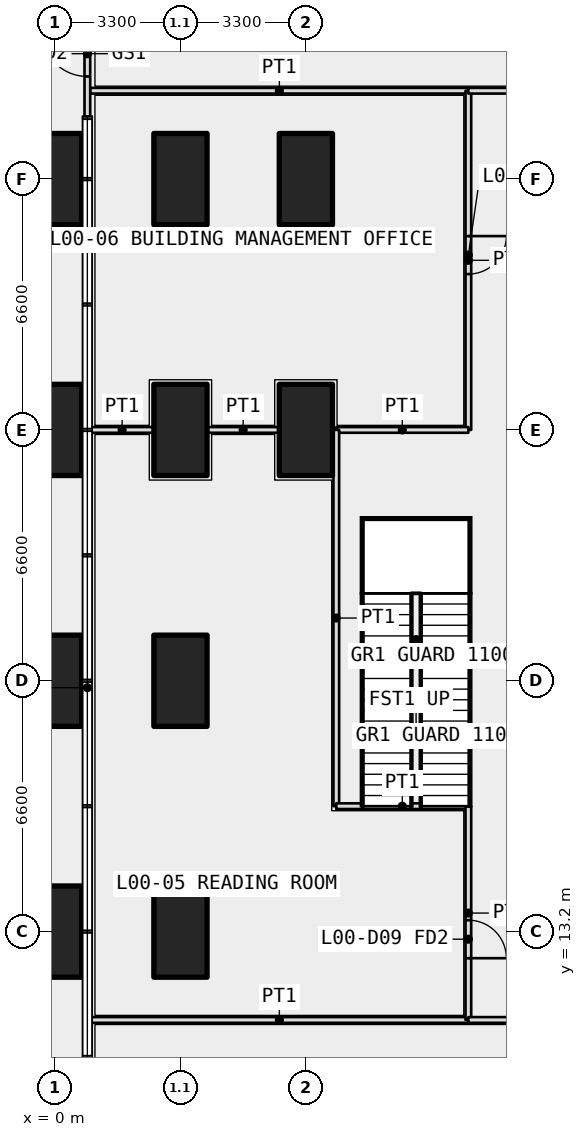
"""IFC4 building model, lengths in metres.
Left out: names, types, materials, properties, quantities, classifications, styles, units other than length and angle.
Written with IfcOpenShell. Run it as: python <this file> out.ifc"""

import sys

from ifc_helpers import new_model, si_unit, direction, frame, frame_2d, origin, origin_2d, place, context, subcontext, project, spatial, rectangle, hollow_circle, extrude, element, fill, save


model = new_model("IFC4")
c1 = context("Model", 3, precision=1e-05, world=origin(), true_north=direction((0.0, 1.0)))
c2 = subcontext(c1, "Body", "Model", "MODEL_VIEW")
j1 = project(units=[si_unit("LENGTHUNIT", "METRE"), si_unit("PLANEANGLEUNIT", "RADIAN")], contexts=[c1])
p1 = place(None, origin())
s1 = spatial("IfcSite", under=j1, at=p1, CompositionType="ELEMENT")
p2 = place(p1, origin())
s2 = spatial("IfcBuilding", under=s1, at=p2, CompositionType="ELEMENT")
p3 = place(p2, origin())
s3 = spatial("IfcBuildingStorey", under=s2, at=p3, CompositionType="ELEMENT", Elevation=0.0)
for number, where, z_axis, x_axis in (
    (1, (0.0, 13.2, 0.0), (0.0, 0.0, 1.0), (0.0, 1.0, 0.0)),
    (2, (0.0, 19.8, 0.0), (0.0, 0.0, 1.0), (0.0, 1.0, 0.0)),
    (3, (0.0, 26.4, 0.0), (0.0, 0.0, 1.0), (0.0, 1.0, 0.0)),
    (4, (0.0, 33.0, 0.0), (0.0, 0.0, 1.0), (0.0, 1.0, 0.0)),
    (5, (3.3, 13.2, 0.0), (0.0, 0.0, 1.0), (0.0, 1.0, 0.0)),
    (6, (3.3, 19.8, 0.0), (0.0, 0.0, 1.0), (0.0, 1.0, 0.0)),
    (7, (3.3, 26.4, 0.0), (0.0, 0.0, 1.0), (0.0, 1.0, 0.0)),
    (8, (3.3, 33.0, 0.0), (0.0, 0.0, 1.0), (0.0, 1.0, 0.0)),
    (9, (6.6, 26.4, 0.0), (0.0, 0.0, 1.0), (0.0, 1.0, 0.0)),
    (10, (6.6, 33.0, 0.0), (0.0, 0.0, 1.0), (0.0, 1.0, 0.0)),
):
    element("IfcColumn", number, at=place(p3, frame(where, z_axis=z_axis, x_axis=x_axis)), inside=s3, PredefinedType="COLUMN", context=c2, shape_type="SweptSolid", body=[
        extrude(rectangle(XDim=2.4, YDim=1.4, at=origin_2d()), origin(), (0.0, 0.0, 1.0), 7.2),
    ])
p4 = place(p3, frame((0.85, 34.65, 0.0), z_axis=(0.0, 0.0, 1.0), x_axis=(0.0, 1.0, 0.0)))
e11 = element("IfcWall", 11, at=p4, inside=s3, PredefinedType="SOLIDWALL", context=c2, shape_type="SweptSolid", body=[
    extrude(rectangle(XDim=3.3, YDim=0.15, at=frame_2d((1.65, 0.0))), origin(), (0.0, 0.0, 1.0), 6.9),
])
p5 = place(p4, frame((1.05, 0.0, 0.0)))
e12 = element("IfcOpeningElement", 12, at=p5, cuts=e11, PredefinedType="OPENING", context=c2, shape_type="SweptSolid", body=[
    extrude(rectangle(XDim=1.2, YDim=2.4, at=frame_2d((0.6, 1.2))), frame((0.0, 0.085, 0.0), z_axis=(0.0, -1.0, 0.0), x_axis=(1.0, 0.0, 0.0)), (0.0, 0.0, 1.0), 0.17),
])
p6 = place(p3, frame((0.93, 10.875, 0.0), z_axis=(0.0, 0.0, 1.0), x_axis=(1.0, 0.0, 0.0)))
e13 = element("IfcWall", 13, at=p6, inside=s3, PredefinedType="PARTITIONING", context=c2, shape_type="SweptSolid", body=[
    extrude(rectangle(XDim=9.945, YDim=0.15, at=frame_2d((4.973, 0.0))), origin(), (0.0, 0.0, 1.0), 5.85),
])
p7 = place(p3, frame((0.93, 26.4, 0.0), z_axis=(0.0, 0.0, 1.0), x_axis=(1.0, 0.0, 0.0)))
e14 = element("IfcWall", 14, at=p7, inside=s3, PredefinedType="PARTITIONING", context=c2, shape_type="SweptSolid", body=[
    extrude(rectangle(XDim=1.67, YDim=0.15, at=frame_2d((0.835, 0.0))), origin(), (0.0, 0.0, 1.0), 5.85),
])
p8 = place(p3, frame((4.0, 26.4, 0.0), z_axis=(0.0, 0.0, 1.0), x_axis=(1.0, 0.0, 0.0)))
e15 = element("IfcWall", 15, at=p8, inside=s3, PredefinedType="PARTITIONING", context=c2, shape_type="SweptSolid", body=[
    extrude(rectangle(XDim=1.9, YDim=0.15, at=frame_2d((0.95, 0.0))), origin(), (0.0, 0.0, 1.0), 5.85),
])
p9 = place(p3, frame((0.93, 35.325, 0.0), z_axis=(0.0, 0.0, 1.0), x_axis=(1.0, 0.0, 0.0)))
e16 = element("IfcWall", 16, at=p9, inside=s3, PredefinedType="PARTITIONING", context=c2, shape_type="SweptSolid", body=[
    extrude(rectangle(XDim=9.945, YDim=0.15, at=frame_2d((4.973, 0.0))), origin(), (0.0, 0.0, 1.0), 5.85),
])
p10 = place(p3, frame((10.875, 35.325, 0.0), z_axis=(0.0, 0.0, 1.0), x_axis=(0.0, -1.0, 0.0)))
e17 = element("IfcWall", 17, at=p10, inside=s3, PredefinedType="PARTITIONING", context=c2, shape_type="SweptSolid", body=[
    extrude(rectangle(XDim=8.925, YDim=0.15, at=frame_2d((4.462, 0.0))), origin(), (0.0, 0.0, 1.0), 5.85),
])
p11 = place(p10, frame((3.825, 0.0, 0.0)))
e18 = element("IfcOpeningElement", 18, at=p11, cuts=e17, PredefinedType="OPENING", context=c2, shape_type="SweptSolid", body=[
    extrude(rectangle(XDim=1.0, YDim=2.1, at=frame_2d((0.5, 1.05))), frame((0.0, 0.085, 0.0), z_axis=(0.0, -1.0, 0.0), x_axis=(1.0, 0.0, 0.0)), (0.0, 0.0, 1.0), 0.17),
])
p12 = place(p3, frame((10.875, 26.4, 0.0), z_axis=(0.0, 0.0, 1.0), x_axis=(-1.0, 0.0, 0.0)))
e19 = element("IfcWall", 19, at=p12, inside=s3, PredefinedType="PARTITIONING", context=c2, shape_type="SweptSolid", body=[
    extrude(rectangle(XDim=3.475, YDim=0.15, at=frame_2d((1.738, 0.0))), origin(), (0.0, 0.0, 1.0), 4.9),
])
p13 = place(p3, frame((7.4, 26.4, 0.0), z_axis=(0.0, 0.0, 1.0), x_axis=(0.0, -1.0, 0.0)))
e20 = element("IfcWall", 20, at=p13, inside=s3, PredefinedType="PARTITIONING", context=c2, shape_type="SweptSolid", body=[
    extrude(rectangle(XDim=9.9, YDim=0.15, at=frame_2d((4.95, 0.0))), origin(), (0.0, 0.0, 1.0), 4.9),
])
p14 = place(p3, frame((7.4, 16.5, 0.0), z_axis=(0.0, 0.0, 1.0), x_axis=(1.0, 0.0, 0.0)))
e21 = element("IfcWall", 21, at=p14, inside=s3, PredefinedType="PARTITIONING", context=c2, shape_type="SweptSolid", body=[
    extrude(rectangle(XDim=3.475, YDim=0.15, at=frame_2d((1.738, 0.0))), origin(), (0.0, 0.0, 1.0), 4.9),
])
p15 = place(p3, frame((10.875, 16.5, 0.0), z_axis=(0.0, 0.0, 1.0), x_axis=(0.0, -1.0, 0.0)))
e22 = element("IfcWall", 22, at=p15, inside=s3, PredefinedType="PARTITIONING", context=c2, shape_type="SweptSolid", body=[
    extrude(rectangle(XDim=5.625, YDim=0.15, at=frame_2d((2.812, 0.0))), origin(), (0.0, 0.0, 1.0), 4.5),
])
p16 = place(p15, frame((3.0, 0.0, 0.0)))
e23 = element("IfcOpeningElement", 23, at=p16, cuts=e22, PredefinedType="OPENING", context=c2, shape_type="SweptSolid", body=[
    extrude(rectangle(XDim=1.0, YDim=2.1, at=frame_2d((0.5, 1.05))), frame((0.0, 0.085, 0.0), z_axis=(0.0, -1.0, 0.0), x_axis=(1.0, 0.0, 0.0)), (0.0, 0.0, 1.0), 0.17),
])
p17 = place(p3, frame((10.875, 10.875, 0.0), z_axis=(0.0, 0.0, 1.0), x_axis=(1.0, 0.0, 0.0)))
e24 = element("IfcWall", 24, at=p17, inside=s3, PredefinedType="PARTITIONING", context=c2, shape_type="SweptSolid", body=[
    extrude(rectangle(XDim=8.925, YDim=0.15, at=frame_2d((4.462, 0.0))), origin(), (0.0, 0.0, 1.0), 4.5),
])
p18 = place(p17, frame((3.225, 0.0, 0.0)))
e25 = element("IfcOpeningElement", 25, at=p18, cuts=e24, PredefinedType="OPENING", context=c2, shape_type="SweptSolid", body=[
    extrude(rectangle(XDim=1.8, YDim=2.1, at=frame_2d((0.9, 1.05))), frame((0.0, 0.085, 0.0), z_axis=(0.0, -1.0, 0.0), x_axis=(1.0, 0.0, 0.0)), (0.0, 0.0, 1.0), 0.17),
])
p19 = place(p3, frame((23.1, 35.325, 0.0), z_axis=(0.0, 0.0, 1.0), x_axis=(-1.0, 0.0, 0.0)))
e26 = element("IfcWall", 26, at=p19, inside=s3, PredefinedType="PARTITIONING", context=c2, shape_type="SweptSolid", body=[
    extrude(rectangle(XDim=12.225, YDim=0.15, at=frame_2d((6.113, 0.0))), origin(), (0.0, 0.0, 1.0), 4.5),
])
p20 = place(p19, frame((6.2, 0.0, 0.0)))
e27 = element("IfcOpeningElement", 27, at=p20, cuts=e26, PredefinedType="OPENING", context=c2, shape_type="SweptSolid", body=[
    extrude(rectangle(XDim=1.8, YDim=2.1, at=frame_2d((0.9, 1.05))), frame((0.0, 0.085, 0.0), z_axis=(0.0, -1.0, 0.0), x_axis=(1.0, 0.0, 0.0)), (0.0, 0.0, 1.0), 0.17),
])
for number, where, z_axis, x_axis in (
    (28, (8.2, 22.25, 0.0), (0.0, 0.0, 1.0), (1.0, 0.0, 0.0)),
    (29, (10.8, 22.25, 0.0), (0.0, 0.0, 1.0), (1.0, 0.0, 0.0)),
    (30, (10.8, 23.95, 0.0), (0.0, 0.0, 1.0), (1.0, 0.0, 0.0)),
    (31, (8.2, 23.95, 0.0), (0.0, 0.0, 1.0), (1.0, 0.0, 0.0)),
):
    element("IfcColumn", number, at=place(p3, frame(where, z_axis=z_axis, x_axis=x_axis)), inside=s3, PredefinedType="COLUMN", context=c2, shape_type="SweptSolid", body=[
        extrude(hollow_circle(Radius=0.084, WallThickness=0.008, at=origin_2d()), origin(), (0.0, 0.0, 1.0), 3.35),
    ])
p21 = place(p5, origin())
e32 = element("IfcDoor", 32, at=p21, inside=s3, OperationType="SINGLE_SWING_RIGHT", PredefinedType="DOOR", context=c2, shape_type="SweptSolid", body=[
    extrude(rectangle(XDim=1.2, YDim=2.4, at=frame_2d((0.6, 1.2))), frame((0.0, 0.025, 0.0), z_axis=(0.0, -1.0, 0.0), x_axis=(1.0, 0.0, 0.0)), (0.0, 0.0, 1.0), 0.05),
])
fill(e12, e32)
p22 = place(p16, origin())
e33 = element("IfcDoor", 33, at=p22, inside=s3, OperationType="SINGLE_SWING_RIGHT", PredefinedType="DOOR", context=c2, shape_type="SweptSolid", body=[
    extrude(rectangle(XDim=1.0, YDim=2.1, at=frame_2d((0.5, 1.05))), frame((0.0, 0.025, 0.0), z_axis=(0.0, -1.0, 0.0), x_axis=(1.0, 0.0, 0.0)), (0.0, 0.0, 1.0), 0.05),
])
fill(e23, e33)
p23 = place(p11, origin())
e34 = element("IfcDoor", 34, at=p23, inside=s3, OperationType="SINGLE_SWING_LEFT", PredefinedType="DOOR", context=c2, shape_type="SweptSolid", body=[
    extrude(rectangle(XDim=1.0, YDim=2.1, at=frame_2d((0.5, 1.05))), frame((0.0, 0.025, 0.0), z_axis=(0.0, -1.0, 0.0), x_axis=(1.0, 0.0, 0.0)), (0.0, 0.0, 1.0), 0.05),
])
fill(e18, e34)
save(model, sys.argv[1])
